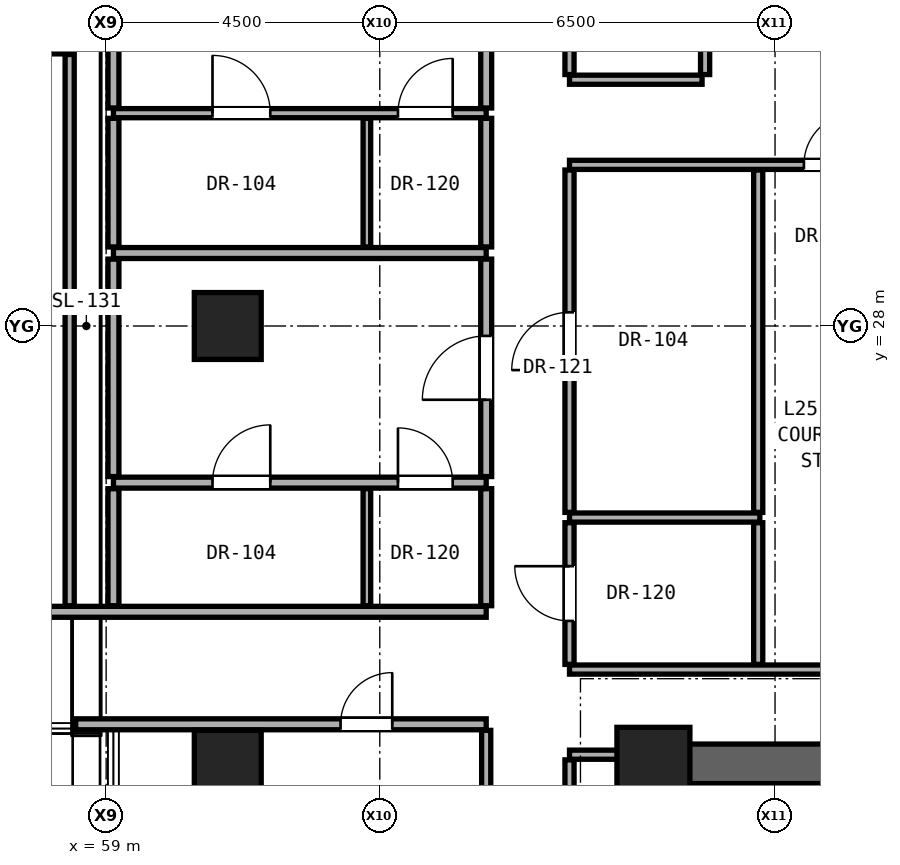
"""IFC4 building model, lengths in metres.
Left out: names, types, materials, properties, quantities, classifications, styles, units other than length and angle.
Written with IfcOpenShell. Run it as: python <this file> out.ifc"""

import sys

from ifc_helpers import new_model, si_unit, direction, frame, frame_2d, origin, origin_2d, place, context, subcontext, project, spatial, rectangle, hollow_rectangle, extrude, element, fill, save


model = new_model("IFC4")
c1 = context("Model", 3, precision=1e-05, world=origin(), true_north=direction((0.0, 1.0)))
c2 = subcontext(c1, "Body", "Model", "MODEL_VIEW")
j1 = project(units=[si_unit("LENGTHUNIT", "METRE"), si_unit("PLANEANGLEUNIT", "RADIAN")], contexts=[c1])
p1 = place(None, origin())
s1 = spatial("IfcSite", under=j1, at=p1, CompositionType="ELEMENT")
p2 = place(p1, origin())
s2 = spatial("IfcBuilding", under=s1, at=p2, CompositionType="ELEMENT")
p3 = place(p2, frame((0.0, 0.0, 91.7)))
s3 = spatial("IfcBuildingStorey", under=s2, at=p3, CompositionType="ELEMENT", Elevation=91.7)
p4 = place(p3, frame((68.0, 20.8, 0.0), z_axis=(0.0, 0.0, 1.0), x_axis=(1.0, 0.0, 0.0)))
e1 = element("IfcColumn", 1, at=p4, inside=s3, PredefinedType="COLUMN", context=c2, shape_type="SweptSolid", body=[
    extrude(rectangle(XDim=1.2, YDim=1.2, at=origin_2d()), origin(), (0.0, 0.0, 1.0), 3.3),
])
for number, where, z_axis, x_axis in (
    (2, (61.0, 20.8, 0.0), (0.0, 0.0, 1.0), (1.0, 0.0, 0.0)),
    (3, (61.0, 28.0, 0.0), (0.0, 0.0, 1.0), (1.0, 0.0, 0.0)),
):
    element("IfcColumn", number, at=place(p3, frame(where, z_axis=z_axis, x_axis=x_axis)), inside=s3, PredefinedType="COLUMN", context=c2, shape_type="SweptSolid", body=[
        extrude(hollow_rectangle(XDim=1.1, YDim=1.1, WallThickness=0.06, at=origin_2d()), origin(), (0.0, 0.0, 1.0), 3.3),
    ])
p5 = place(p3, frame((68.0, 15.2, 0.0), z_axis=(0.0, 0.0, 1.0), x_axis=(0.0, 1.0, 0.0)))
e4 = element("IfcWall", 4, at=p5, inside=s3, PredefinedType="SHEAR", context=c2, shape_type="SweptSolid", body=[
    extrude(rectangle(XDim=5.6, YDim=0.65, at=frame_2d((2.8, 0.0))), origin(), (0.0, 0.0, 1.0), 3.08),
])
p6 = place(p3, frame((68.0, 20.8, 0.0), z_axis=(0.0, 0.0, 1.0), x_axis=(1.0, 0.0, 0.0)))
e5 = element("IfcWall", 5, at=p6, inside=s3, PredefinedType="SHEAR", context=c2, shape_type="SweptSolid", body=[
    extrude(rectangle(XDim=17.0, YDim=0.65, at=frame_2d((8.5, 0.0))), origin(), (0.0, 0.0, 1.0), 3.08),
])
p7 = place(p6, frame((9.55, 0.0, 0.0)))
e6 = element("IfcOpeningElement", 6, at=p7, cuts=e5, PredefinedType="OPENING", context=c2, shape_type="SweptSolid", body=[
    extrude(rectangle(XDim=1.3, YDim=2.3, at=frame_2d((0.65, 1.15))), frame((0.0, 0.335, 0.0), z_axis=(0.0, -1.0, 0.0), x_axis=(1.0, 0.0, 0.0)), (0.0, 0.0, 1.0), 0.67),
])
p8 = place(p6, frame((12.05, 0.0, 0.0)))
e7 = element("IfcOpeningElement", 7, at=p8, cuts=e5, PredefinedType="OPENING", context=c2, shape_type="SweptSolid", body=[
    extrude(rectangle(XDim=1.3, YDim=2.3, at=frame_2d((0.65, 1.15))), frame((0.0, 0.335, 0.0), z_axis=(0.0, -1.0, 0.0), x_axis=(1.0, 0.0, 0.0)), (0.0, 0.0, 1.0), 0.67),
])
p9 = place(p3, frame((66.62, 20.95, 0.0), z_axis=(0.0, 0.0, 1.0), x_axis=(1.0, 0.0, 0.0)))
e8 = element("IfcWall", 8, at=p9, inside=s3, PredefinedType="PARTITIONING", context=c2, shape_type="SweptSolid", body=[
    extrude(rectangle(XDim=1.06, YDim=0.15, at=frame_2d((0.53, 0.0))), origin(), (0.0, 0.0, 1.0), 2.472),
])
p10 = place(p3, frame((58.5, 21.45, 0.0), z_axis=(0.0, 0.0, 1.0), x_axis=(1.0, 0.0, 0.0)))
e9 = element("IfcWall", 9, at=p10, inside=s3, PredefinedType="PARTITIONING", context=c2, shape_type="SweptSolid", body=[
    extrude(rectangle(XDim=6.75, YDim=0.18, at=frame_2d((3.375, 0.0))), origin(), (0.0, 0.0, 1.0), 2.085),
])
p11 = place(p10, frame((4.355, 0.0, 0.0)))
e10 = element("IfcOpeningElement", 10, at=p11, cuts=e9, PredefinedType="OPENING", context=c2, shape_type="SweptSolid", body=[
    extrude(rectangle(XDim=0.85, YDim=2.01, at=frame_2d((0.425, 1.005))), frame((0.0, 0.1, 0.0), z_axis=(0.0, -1.0, 0.0), x_axis=(1.0, 0.0, 0.0)), (0.0, 0.0, 1.0), 0.2),
])
p12 = place(p3, frame((66.62, 22.35, 0.0), z_axis=(0.0, 0.0, 1.0), x_axis=(1.0, 0.0, 0.0)))
e11 = element("IfcWall", 11, at=p12, inside=s3, PredefinedType="PARTITIONING", context=c2, shape_type="SweptSolid", body=[
    extrude(rectangle(XDim=19.63, YDim=0.15, at=frame_2d((9.815, 0.0))), origin(), (0.0, 0.0, 1.0), 2.145),
])
p13 = place(p12, frame((12.085, 0.0, 0.0)))
e12 = element("IfcOpeningElement", 12, at=p13, cuts=e11, PredefinedType="OPENING", context=c2, shape_type="SweptSolid", body=[
    extrude(rectangle(XDim=0.85, YDim=2.01, at=frame_2d((0.425, 1.005))), frame((0.0, 0.085, 0.0), z_axis=(0.0, -1.0, 0.0), x_axis=(1.0, 0.0, 0.0)), (0.0, 0.0, 1.0), 0.17),
])
p14 = place(p3, frame((32.14, 23.3, 0.0), z_axis=(0.0, 0.0, 1.0), x_axis=(1.0, 0.0, 0.0)))
e13 = element("IfcWall", 13, at=p14, inside=s3, PredefinedType="PARTITIONING", context=c2, shape_type="SweptSolid", body=[
    extrude(rectangle(XDim=33.11, YDim=0.18, at=frame_2d((16.555, 0.0))), origin(), (0.0, 0.0, 1.0), 2.145),
])
p15 = place(p14, frame((11.525, 0.0, 0.0)))
e14 = element("IfcOpeningElement", 14, at=p15, cuts=e13, PredefinedType="OPENING", context=c2, shape_type="SweptSolid", body=[
    extrude(rectangle(XDim=0.85, YDim=2.01, at=frame_2d((0.425, 1.005))), frame((0.0, 0.1, 0.0), z_axis=(0.0, -1.0, 0.0), x_axis=(1.0, 0.0, 0.0)), (0.0, 0.0, 1.0), 0.2),
])
p16 = place(p14, frame((23.185, 0.0, 0.0)))
e15 = element("IfcOpeningElement", 15, at=p16, cuts=e13, PredefinedType="OPENING", context=c2, shape_type="SweptSolid", body=[
    extrude(rectangle(XDim=0.85, YDim=2.01, at=frame_2d((0.425, 1.005))), frame((0.0, 0.1, 0.0), z_axis=(0.0, -1.0, 0.0), x_axis=(1.0, 0.0, 0.0)), (0.0, 0.0, 1.0), 0.2),
])
p17 = place(p3, frame((66.62, 24.85, 0.0), z_axis=(0.0, 0.0, 1.0), x_axis=(1.0, 0.0, 0.0)))
e16 = element("IfcWall", 16, at=p17, inside=s3, PredefinedType="PARTITIONING", context=c2, shape_type="SweptSolid", body=[
    extrude(rectangle(XDim=3.13, YDim=0.15, at=frame_2d((1.565, 0.0))), origin(), (0.0, 0.0, 1.0), 2.145),
])
p18 = place(p3, frame((59.12, 25.424, 0.0), z_axis=(0.0, 0.0, 1.0), x_axis=(1.0, 0.0, 0.0)))
e17 = element("IfcWall", 17, at=p18, inside=s3, PredefinedType="PARTITIONING", context=c2, shape_type="SweptSolid", body=[
    extrude(rectangle(XDim=6.13, YDim=0.18, at=frame_2d((3.065, 0.0))), origin(), (0.0, 0.0, 1.0), 2.216),
])
p19 = place(p18, frame((1.629, 0.0, 0.0)))
e18 = element("IfcOpeningElement", 18, at=p19, cuts=e17, PredefinedType="OPENING", context=c2, shape_type="SweptSolid", body=[
    extrude(rectangle(XDim=0.95, YDim=2.15, at=frame_2d((0.475, 1.075))), frame((0.0, 0.1, 0.0), z_axis=(0.0, -1.0, 0.0), x_axis=(1.0, 0.0, 0.0)), (0.0, 0.0, 1.0), 0.2),
])
p20 = place(p18, frame((4.679, 0.0, 0.0)))
e19 = element("IfcOpeningElement", 19, at=p20, cuts=e17, PredefinedType="OPENING", context=c2, shape_type="SweptSolid", body=[
    extrude(rectangle(XDim=0.9, YDim=2.1, at=frame_2d((0.45, 1.05))), frame((0.0, 0.1, 0.0), z_axis=(0.0, -1.0, 0.0), x_axis=(1.0, 0.0, 0.0)), (0.0, 0.0, 1.0), 0.2),
])
p21 = place(p3, frame((59.12, 29.2, 0.0), z_axis=(0.0, 0.0, 1.0), x_axis=(1.0, 0.0, 0.0)))
e20 = element("IfcWall", 20, at=p21, inside=s3, PredefinedType="PARTITIONING", context=c2, shape_type="SweptSolid", body=[
    extrude(rectangle(XDim=6.13, YDim=0.18, at=frame_2d((3.065, 0.0))), origin(), (0.0, 0.0, 1.0), 2.216),
])
p22 = place(p3, frame((66.62, 30.65, 0.0), z_axis=(0.0, 0.0, 1.0), x_axis=(1.0, 0.0, 0.0)))
e21 = element("IfcWall", 21, at=p22, inside=s3, PredefinedType="PARTITIONING", context=c2, shape_type="SweptSolid", body=[
    extrude(rectangle(XDim=19.63, YDim=0.15, at=frame_2d((9.815, 0.0))), origin(), (0.0, 0.0, 1.0), 2.145),
])
p23 = place(p22, frame((3.855, 0.0, 0.0)))
e22 = element("IfcOpeningElement", 22, at=p23, cuts=e21, PredefinedType="OPENING", context=c2, shape_type="SweptSolid", body=[
    extrude(rectangle(XDim=0.85, YDim=2.01, at=frame_2d((0.425, 1.005))), frame((0.0, 0.085, 0.0), z_axis=(0.0, -1.0, 0.0), x_axis=(1.0, 0.0, 0.0)), (0.0, 0.0, 1.0), 0.17),
])
p24 = place(p22, frame((12.085, 0.0, 0.0)))
e23 = element("IfcOpeningElement", 23, at=p24, cuts=e21, PredefinedType="OPENING", context=c2, shape_type="SweptSolid", body=[
    extrude(rectangle(XDim=0.85, YDim=2.01, at=frame_2d((0.425, 1.005))), frame((0.0, 0.085, 0.0), z_axis=(0.0, -1.0, 0.0), x_axis=(1.0, 0.0, 0.0)), (0.0, 0.0, 1.0), 0.17),
])
p25 = place(p3, frame((59.12, 31.5, 0.0), z_axis=(0.0, 0.0, 1.0), x_axis=(1.0, 0.0, 0.0)))
e24 = element("IfcWall", 24, at=p25, inside=s3, PredefinedType="PARTITIONING", context=c2, shape_type="SweptSolid", body=[
    extrude(rectangle(XDim=6.13, YDim=0.15, at=frame_2d((3.065, 0.0))), origin(), (0.0, 0.0, 1.0), 2.216),
])
p26 = place(p25, frame((1.629, 0.0, 0.0)))
e25 = element("IfcOpeningElement", 25, at=p26, cuts=e24, PredefinedType="OPENING", context=c2, shape_type="SweptSolid", body=[
    extrude(rectangle(XDim=0.95, YDim=2.15, at=frame_2d((0.475, 1.075))), frame((0.0, 0.085, 0.0), z_axis=(0.0, -1.0, 0.0), x_axis=(1.0, 0.0, 0.0)), (0.0, 0.0, 1.0), 0.17),
])
p27 = place(p25, frame((4.679, 0.0, 0.0)))
e26 = element("IfcOpeningElement", 26, at=p27, cuts=e24, PredefinedType="OPENING", context=c2, shape_type="SweptSolid", body=[
    extrude(rectangle(XDim=0.9, YDim=2.1, at=frame_2d((0.45, 1.05))), frame((0.0, 0.085, 0.0), z_axis=(0.0, -1.0, 0.0), x_axis=(1.0, 0.0, 0.0)), (0.0, 0.0, 1.0), 0.17),
])
p28 = place(p3, frame((66.62, 32.05, 0.0), z_axis=(0.0, 0.0, 1.0), x_axis=(1.0, 0.0, 0.0)))
e27 = element("IfcWall", 27, at=p28, inside=s3, PredefinedType="PARTITIONING", context=c2, shape_type="SweptSolid", body=[
    extrude(rectangle(XDim=2.18, YDim=0.15, at=frame_2d((1.09, 0.0))), origin(), (0.0, 0.0, 1.0), 2.145),
])
p29 = place(p3, frame((53.1, 32.55, 0.0), z_axis=(0.0, 0.0, 1.0), x_axis=(1.0, 0.0, 0.0)))
e28 = element("IfcWall", 28, at=p29, inside=s3, PredefinedType="PARTITIONING", context=c2, shape_type="SweptSolid", body=[
    extrude(rectangle(XDim=5.3, YDim=0.15, at=frame_2d((2.65, 0.0))), origin(), (0.0, 0.0, 1.0), 2.316),
])
p30 = place(p3, frame((58.4, 23.4, 0.0), z_axis=(0.0, 0.0, 1.0), x_axis=(0.0, 1.0, 0.0)))
e29 = element("IfcWall", 29, at=p30, inside=s3, PredefinedType="PARTITIONING", context=c2, shape_type="SweptSolid", body=[
    extrude(rectangle(XDim=9.065, YDim=0.15, at=frame_2d((4.533, 0.0))), origin(), (0.0, 0.0, 1.0), 2.085),
])
p31 = place(p3, frame((59.12, 23.4, 0.0), z_axis=(0.0, 0.0, 1.0), x_axis=(0.0, 1.0, 0.0)))
e30 = element("IfcWall", 30, at=p31, inside=s3, PredefinedType="PARTITIONING", context=c2, shape_type="SweptSolid", body=[
    extrude(rectangle(XDim=1.924, YDim=0.18, at=frame_2d((0.962, 0.0))), origin(), (0.0, 0.0, 1.0), 3.08),
])
p32 = place(p3, frame((59.12, 25.524, 0.0), z_axis=(0.0, 0.0, 1.0), x_axis=(0.0, 1.0, 0.0)))
e31 = element("IfcWall", 31, at=p32, inside=s3, PredefinedType="PARTITIONING", context=c2, shape_type="SweptSolid", body=[
    extrude(rectangle(XDim=3.576, YDim=0.18, at=frame_2d((1.788, 0.0))), origin(), (0.0, 0.0, 1.0), 2.085),
])
p33 = place(p3, frame((59.12, 29.3, 0.0), z_axis=(0.0, 0.0, 1.0), x_axis=(0.0, 1.0, 0.0)))
e32 = element("IfcWall", 32, at=p33, inside=s3, PredefinedType="PARTITIONING", context=c2, shape_type="SweptSolid", body=[
    extrude(rectangle(XDim=2.115, YDim=0.18, at=frame_2d((1.058, 0.0))), origin(), (0.0, 0.0, 1.0), 3.08),
])
p34 = place(p3, frame((59.12, 31.585, 0.0), z_axis=(0.0, 0.0, 1.0), x_axis=(0.0, 1.0, 0.0)))
e33 = element("IfcWall", 33, at=p34, inside=s3, PredefinedType="PARTITIONING", context=c2, shape_type="SweptSolid", body=[
    extrude(rectangle(XDim=3.005, YDim=0.18, at=frame_2d((1.502, 0.0))), origin(), (0.0, 0.0, 1.0), 2.085),
])
p35 = place(p3, frame((63.288, 23.4, 0.0), z_axis=(0.0, 0.0, 1.0), x_axis=(0.0, 1.0, 0.0)))
e34 = element("IfcWall", 34, at=p35, inside=s3, PredefinedType="PARTITIONING", context=c2, shape_type="SweptSolid", body=[
    extrude(rectangle(XDim=1.924, YDim=0.125, at=frame_2d((0.962, 0.0))), origin(), (0.0, 0.0, 1.0), 3.08),
])
p36 = place(p3, frame((63.288, 29.3, 0.0), z_axis=(0.0, 0.0, 1.0), x_axis=(0.0, 1.0, 0.0)))
e35 = element("IfcWall", 35, at=p36, inside=s3, PredefinedType="PARTITIONING", context=c2, shape_type="SweptSolid", body=[
    extrude(rectangle(XDim=2.115, YDim=0.125, at=frame_2d((1.058, 0.0))), origin(), (0.0, 0.0, 1.0), 3.08),
])
p37 = place(p3, frame((65.25, 20.385, 0.0), z_axis=(0.0, 0.0, 1.0), x_axis=(0.0, 1.0, 0.0)))
e36 = element("IfcWall", 36, at=p37, inside=s3, PredefinedType="PARTITIONING", context=c2, shape_type="SweptSolid", body=[
    extrude(rectangle(XDim=0.965, YDim=0.15, at=frame_2d((0.482, 0.0))), origin(), (0.0, 0.0, 1.0), 2.472),
])
p38 = place(p3, frame((65.25, 23.4, 0.0), z_axis=(0.0, 0.0, 1.0), x_axis=(0.0, 1.0, 0.0)))
e37 = element("IfcWall", 37, at=p38, inside=s3, PredefinedType="PARTITIONING", context=c2, shape_type="SweptSolid", body=[
    extrude(rectangle(XDim=1.924, YDim=0.18, at=frame_2d((0.962, 0.0))), origin(), (0.0, 0.0, 1.0), 3.08),
])
p39 = place(p3, frame((65.25, 25.524, 0.0), z_axis=(0.0, 0.0, 1.0), x_axis=(0.0, 1.0, 0.0)))
e38 = element("IfcWall", 38, at=p39, inside=s3, PredefinedType="PARTITIONING", context=c2, shape_type="SweptSolid", body=[
    extrude(rectangle(XDim=3.576, YDim=0.18, at=frame_2d((1.788, 0.0))), origin(), (0.0, 0.0, 1.0), 2.299),
])
p40 = place(p39, frame((1.263, 0.0, 0.0)))
e39 = element("IfcOpeningElement", 39, at=p40, cuts=e38, PredefinedType="OPENING", context=c2, shape_type="SweptSolid", body=[
    extrude(rectangle(XDim=1.05, YDim=2.2, at=frame_2d((0.525, 1.1))), frame((0.0, 0.1, 0.0), z_axis=(0.0, -1.0, 0.0), x_axis=(1.0, 0.0, 0.0)), (0.0, 0.0, 1.0), 0.2),
])
p41 = place(p3, frame((65.25, 29.3, 0.0), z_axis=(0.0, 0.0, 1.0), x_axis=(0.0, 1.0, 0.0)))
e40 = element("IfcWall", 40, at=p41, inside=s3, PredefinedType="PARTITIONING", context=c2, shape_type="SweptSolid", body=[
    extrude(rectangle(XDim=2.115, YDim=0.18, at=frame_2d((1.058, 0.0))), origin(), (0.0, 0.0, 1.0), 3.08),
])
p42 = place(p3, frame((65.25, 31.585, 0.0), z_axis=(0.0, 0.0, 1.0), x_axis=(0.0, 1.0, 0.0)))
e41 = element("IfcWall", 41, at=p42, inside=s3, PredefinedType="PARTITIONING", context=c2, shape_type="SweptSolid", body=[
    extrude(rectangle(XDim=4.03, YDim=0.18, at=frame_2d((2.015, 0.0))), origin(), (0.0, 0.0, 1.0), 2.472),
])
p43 = place(p42, frame((1.49, 0.0, 0.0)))
e42 = element("IfcOpeningElement", 42, at=p43, cuts=e41, PredefinedType="OPENING", context=c2, shape_type="SweptSolid", body=[
    extrude(rectangle(XDim=1.05, YDim=2.2, at=frame_2d((0.525, 1.1))), frame((0.0, 0.1, 0.0), z_axis=(0.0, -1.0, 0.0), x_axis=(1.0, 0.0, 0.0)), (0.0, 0.0, 1.0), 0.2),
])
p44 = place(p3, frame((66.62, 20.385, 0.0), z_axis=(0.0, 0.0, 1.0), x_axis=(0.0, 1.0, 0.0)))
e43 = element("IfcWall", 43, at=p44, inside=s3, PredefinedType="PARTITIONING", context=c2, shape_type="SweptSolid", body=[
    extrude(rectangle(XDim=0.48, YDim=0.15, at=frame_2d((0.24, 0.0))), origin(), (0.0, 0.0, 1.0), 2.472),
])
p45 = place(p3, frame((66.62, 22.435, 0.0), z_axis=(0.0, 0.0, 1.0), x_axis=(0.0, 1.0, 0.0)))
e44 = element("IfcWall", 44, at=p45, inside=s3, PredefinedType="PARTITIONING", context=c2, shape_type="SweptSolid", body=[
    extrude(rectangle(XDim=2.33, YDim=0.15, at=frame_2d((1.165, 0.0))), origin(), (0.0, 0.0, 1.0), 3.08),
])
p46 = place(p45, frame((0.715, 0.0, 0.0)))
e45 = element("IfcOpeningElement", 45, at=p46, cuts=e44, PredefinedType="OPENING", context=c2, shape_type="SweptSolid", body=[
    extrude(rectangle(XDim=0.9, YDim=2.1, at=frame_2d((0.45, 1.05))), frame((0.0, 0.085, 0.0), z_axis=(0.0, -1.0, 0.0), x_axis=(1.0, 0.0, 0.0)), (0.0, 0.0, 1.0), 0.17),
])
p47 = place(p3, frame((66.62, 24.935, 0.0), z_axis=(0.0, 0.0, 1.0), x_axis=(0.0, 1.0, 0.0)))
e46 = element("IfcWall", 46, at=p47, inside=s3, PredefinedType="PARTITIONING", context=c2, shape_type="SweptSolid", body=[
    extrude(rectangle(XDim=5.63, YDim=0.15, at=frame_2d((2.815, 0.0))), origin(), (0.0, 0.0, 1.0), 2.299),
])
p48 = place(p47, frame((2.34, 0.0, 0.0)))
e47 = element("IfcOpeningElement", 47, at=p48, cuts=e46, PredefinedType="OPENING", context=c2, shape_type="SweptSolid", body=[
    extrude(rectangle(XDim=0.95, YDim=2.15, at=frame_2d((0.475, 1.075))), frame((0.0, 0.085, 0.0), z_axis=(0.0, -1.0, 0.0), x_axis=(1.0, 0.0, 0.0)), (0.0, 0.0, 1.0), 0.17),
])
p49 = place(p3, frame((66.62, 32.135, 0.0), z_axis=(0.0, 0.0, 1.0), x_axis=(0.0, 1.0, 0.0)))
e48 = element("IfcWall", 48, at=p49, inside=s3, PredefinedType="PARTITIONING", context=c2, shape_type="SweptSolid", body=[
    extrude(rectangle(XDim=3.48, YDim=0.15, at=frame_2d((1.74, 0.0))), origin(), (0.0, 0.0, 1.0), 2.472),
])
p50 = place(p3, frame((68.85, 32.135, 0.0), z_axis=(0.0, 0.0, 1.0), x_axis=(0.0, 1.0, 0.0)))
e49 = element("IfcWall", 49, at=p50, inside=s3, PredefinedType="PARTITIONING", context=c2, shape_type="SweptSolid", body=[
    extrude(rectangle(XDim=2.745, YDim=0.15, at=frame_2d((1.373, 0.0))), origin(), (0.0, 0.0, 1.0), 3.08),
])
p51 = place(p3, frame((69.723, 22.435, 0.0), z_axis=(0.0, 0.0, 1.0), x_axis=(0.0, 1.0, 0.0)))
e50 = element("IfcWall", 50, at=p51, inside=s3, PredefinedType="PARTITIONING", context=c2, shape_type="SweptSolid", body=[
    extrude(rectangle(XDim=2.33, YDim=0.15, at=frame_2d((1.165, 0.0))), origin(), (0.0, 0.0, 1.0), 3.08),
])
p52 = place(p3, frame((69.723, 24.935, 0.0), z_axis=(0.0, 0.0, 1.0), x_axis=(0.0, 1.0, 0.0)))
e51 = element("IfcWall", 51, at=p52, inside=s3, PredefinedType="PARTITIONING", context=c2, shape_type="SweptSolid", body=[
    extrude(rectangle(XDim=5.63, YDim=0.15, at=frame_2d((2.815, 0.0))), origin(), (0.0, 0.0, 1.0), 2.145),
])
p53 = place(p46, origin())
e52 = element("IfcDoor", 52, at=p53, inside=s3, OperationType="SINGLE_SWING_RIGHT", PredefinedType="DOOR", context=c2, shape_type="SweptSolid", body=[
    extrude(rectangle(XDim=0.9, YDim=2.1, at=frame_2d((0.45, 1.05))), frame((0.0, 0.025, 0.0), z_axis=(0.0, -1.0, 0.0), x_axis=(1.0, 0.0, 0.0)), (0.0, 0.0, 1.0), 0.05),
])
fill(e45, e52)
p54 = place(p40, origin())
e53 = element("IfcDoor", 53, at=p54, inside=s3, OperationType="SINGLE_SWING_LEFT", PredefinedType="DOOR", context=c2, shape_type="SweptSolid", body=[
    extrude(rectangle(XDim=1.05, YDim=2.2, at=frame_2d((0.525, 1.1))), frame((0.0, 0.025, 0.0), z_axis=(0.0, -1.0, 0.0), x_axis=(1.0, 0.0, 0.0)), (0.0, 0.0, 1.0), 0.05),
])
fill(e39, e53)
p55 = place(p19, origin())
e54 = element("IfcDoor", 54, at=p55, inside=s3, OperationType="SINGLE_SWING_RIGHT", PredefinedType="DOOR", context=c2, shape_type="SweptSolid", body=[
    extrude(rectangle(XDim=0.95, YDim=2.15, at=frame_2d((0.475, 1.075))), frame((0.0, 0.025, 0.0), z_axis=(0.0, -1.0, 0.0), x_axis=(1.0, 0.0, 0.0)), (0.0, 0.0, 1.0), 0.05),
])
fill(e18, e54)
p56 = place(p20, origin())
e55 = element("IfcDoor", 55, at=p56, inside=s3, OperationType="SINGLE_SWING_LEFT", PredefinedType="DOOR", context=c2, shape_type="SweptSolid", body=[
    extrude(rectangle(XDim=0.9, YDim=2.1, at=frame_2d((0.45, 1.05))), frame((0.0, 0.025, 0.0), z_axis=(0.0, -1.0, 0.0), x_axis=(1.0, 0.0, 0.0)), (0.0, 0.0, 1.0), 0.05),
])
fill(e19, e55)
p57 = place(p26, origin())
e56 = element("IfcDoor", 56, at=p57, inside=s3, OperationType="SINGLE_SWING_LEFT", PredefinedType="DOOR", context=c2, shape_type="SweptSolid", body=[
    extrude(rectangle(XDim=0.95, YDim=2.15, at=frame_2d((0.475, 1.075))), frame((0.0, 0.025, 0.0), z_axis=(0.0, -1.0, 0.0), x_axis=(1.0, 0.0, 0.0)), (0.0, 0.0, 1.0), 0.05),
])
fill(e25, e56)
p58 = place(p27, origin())
e57 = element("IfcDoor", 57, at=p58, inside=s3, OperationType="SINGLE_SWING_RIGHT", PredefinedType="DOOR", context=c2, shape_type="SweptSolid", body=[
    extrude(rectangle(XDim=0.9, YDim=2.1, at=frame_2d((0.45, 1.05))), frame((0.0, 0.025, 0.0), z_axis=(0.0, -1.0, 0.0), x_axis=(1.0, 0.0, 0.0)), (0.0, 0.0, 1.0), 0.05),
])
fill(e26, e57)
p59 = place(p48, origin())
e58 = element("IfcDoor", 58, at=p59, inside=s3, OperationType="SINGLE_SWING_LEFT", PredefinedType="DOOR", context=c2, shape_type="SweptSolid", body=[
    extrude(rectangle(XDim=0.95, YDim=2.15, at=frame_2d((0.475, 1.075))), frame((0.0, 0.025, 0.0), z_axis=(0.0, -1.0, 0.0), x_axis=(1.0, 0.0, 0.0)), (0.0, 0.0, 1.0), 0.05),
])
fill(e47, e58)
p60 = place(p23, origin())
e59 = element("IfcDoor", 59, at=p60, inside=s3, OperationType="SINGLE_SWING_RIGHT", PredefinedType="DOOR", context=c2, shape_type="SweptSolid", body=[
    extrude(rectangle(XDim=0.85, YDim=2.01, at=frame_2d((0.425, 1.005))), frame((0.0, 0.025, 0.0), z_axis=(0.0, -1.0, 0.0), x_axis=(1.0, 0.0, 0.0)), (0.0, 0.0, 1.0), 0.05),
])
fill(e22, e59)
p61 = place(p11, origin())
e60 = element("IfcDoor", 60, at=p61, inside=s3, OperationType="SINGLE_SWING_RIGHT", PredefinedType="DOOR", context=c2, shape_type="SweptSolid", body=[
    extrude(rectangle(XDim=0.85, YDim=2.01, at=frame_2d((0.425, 1.005))), frame((0.0, 0.025, 0.0), z_axis=(0.0, -1.0, 0.0), x_axis=(1.0, 0.0, 0.0)), (0.0, 0.0, 1.0), 0.05),
])
fill(e10, e60)
save(model, sys.argv[1])
